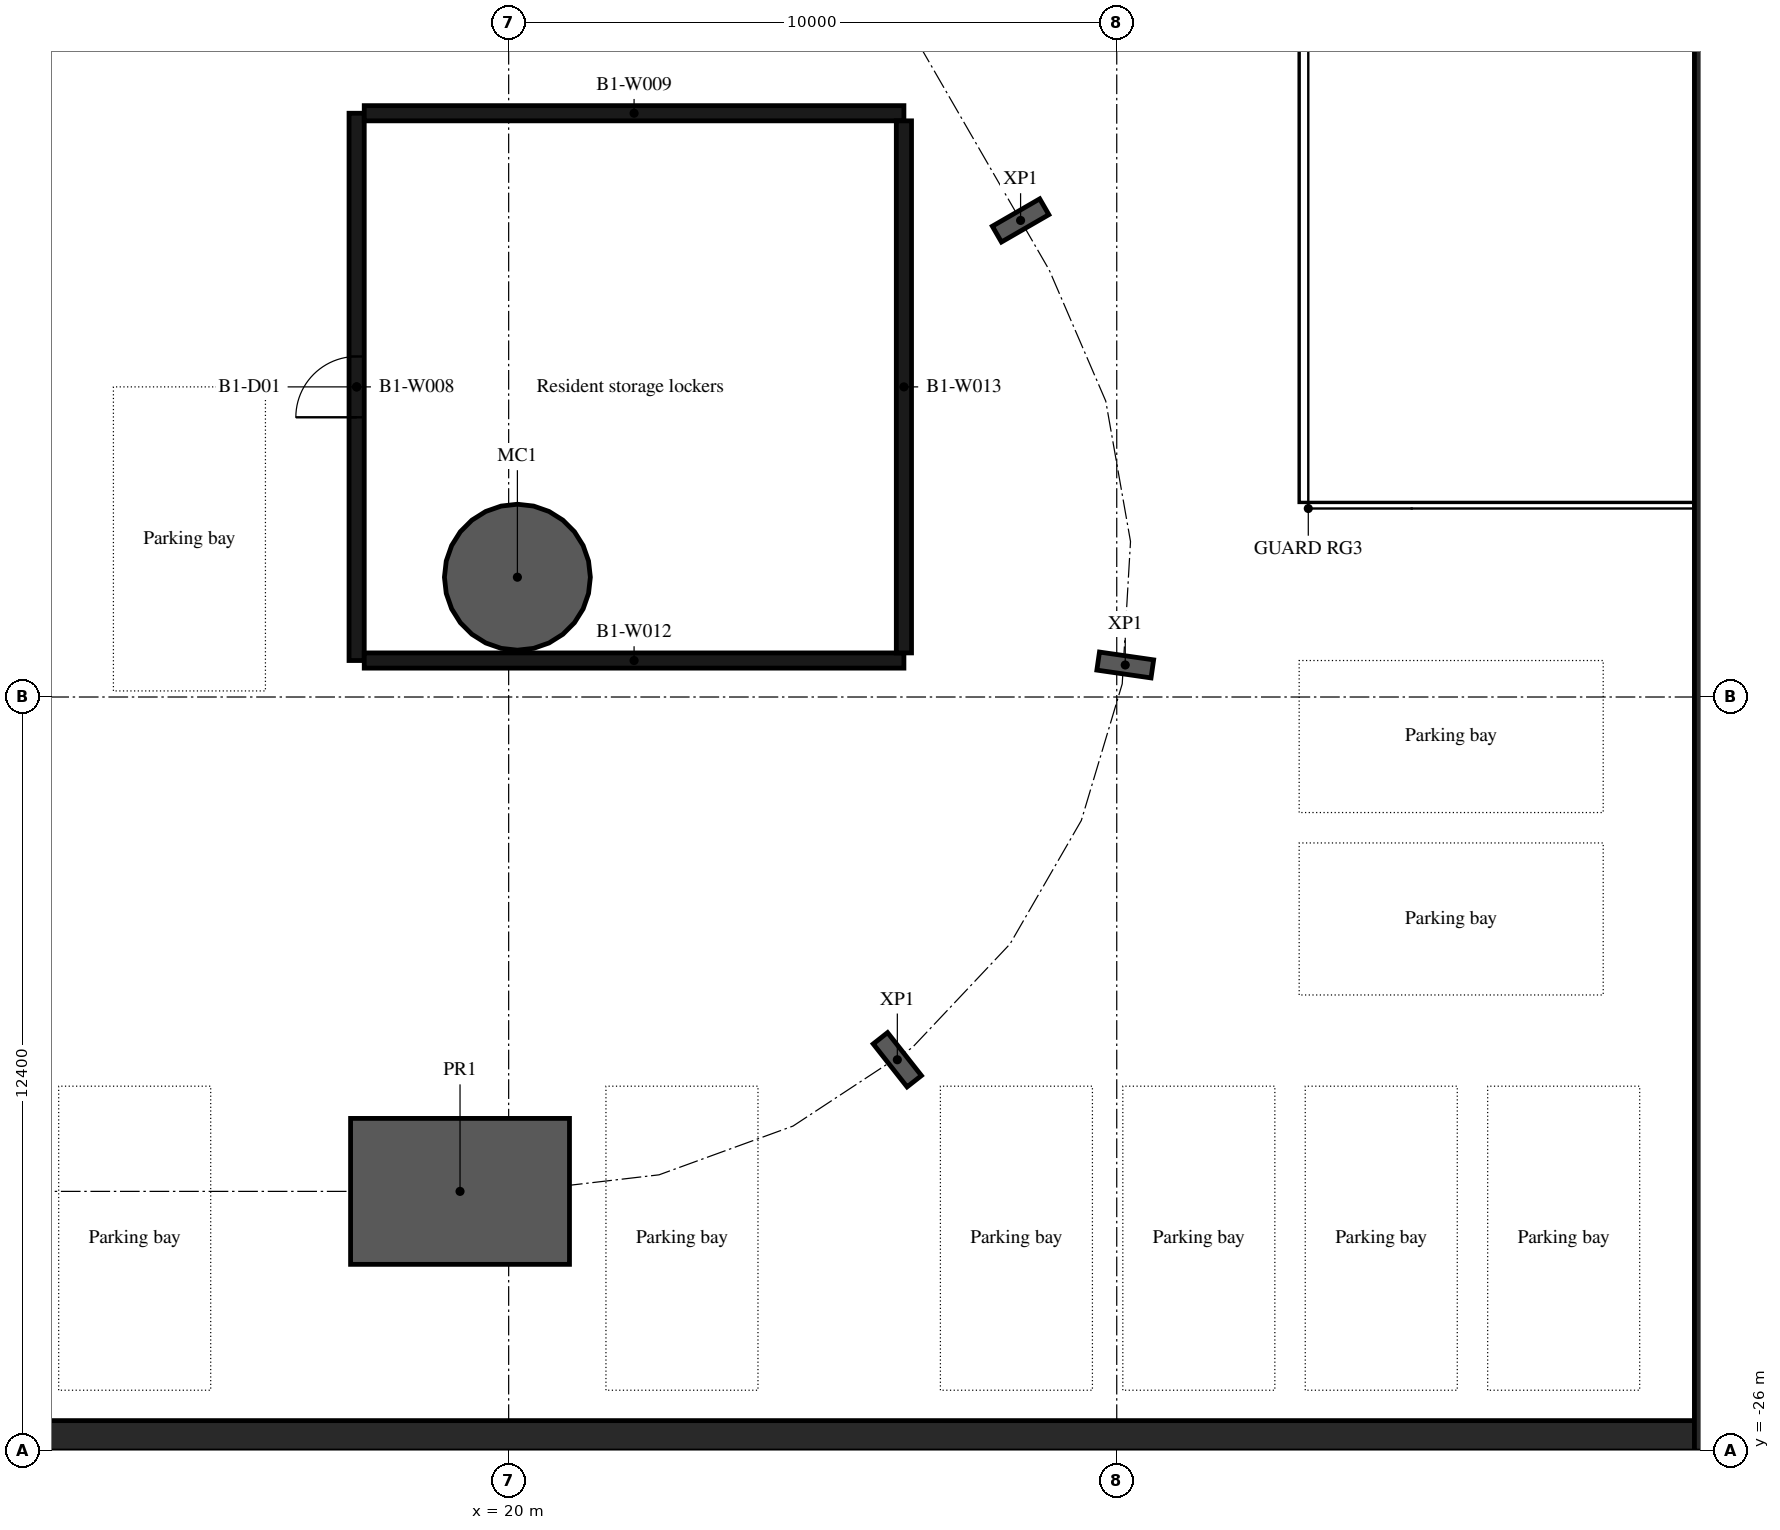
"""IFC4 building model, lengths in metres.
Left out: names, types, materials, properties, quantities, classifications, styles, units other than length and angle.
Written with IfcOpenShell. Run it as: python <this file> out.ifc"""

import sys

from ifc_helpers import new_model, si_unit, direction, frame, frame_2d, origin, origin_2d, place, context, subcontext, project, spatial, rectangle, hollow_circle, i_section, extrude, element, fill, save


model = new_model("IFC4")
c1 = context("Model", 3, precision=1e-05, world=origin(), true_north=direction((0.0, 1.0)))
c2 = subcontext(c1, "Body", "Model", "MODEL_VIEW")
j1 = project(units=[si_unit("LENGTHUNIT", "METRE"), si_unit("PLANEANGLEUNIT", "RADIAN")], contexts=[c1])
p1 = place(None, origin())
s1 = spatial("IfcSite", under=j1, at=p1, CompositionType="ELEMENT")
p2 = place(p1, origin())
s2 = spatial("IfcBuilding", under=s1, at=p2, CompositionType="ELEMENT")
p3 = place(p2, frame((0.0, 0.0, -4.2)))
s3 = spatial("IfcBuildingStorey", under=s2, at=p3, CompositionType="ELEMENT", Elevation=-4.2)
p4 = place(p3, frame((20.144, -11.63, -0.38), z_axis=(0.0, 0.0, 1.0), x_axis=(1.0, 0.0, 0.0)))
e1 = element("IfcColumn", 1, at=p4, inside=s3, PredefinedType="COLUMN", context=c2, shape_type="SweptSolid", body=[
    extrude(hollow_circle(Radius=1.2, WallThickness=0.06, at=origin_2d()), origin(), (0.0, 0.0, 1.0), 4.16),
])
for number, where, z_axis, x_axis in (
    (2, (26.392, -19.565, -0.38), (0.0, 0.0, 1.0), (-0.786, -0.619, 0.0)),
    (3, (30.14, -13.073, -0.38), (0.0, 0.0, 1.0), (-0.143, -0.99, 0.0)),
    (4, (28.419, -5.763, -0.38), (0.0, 0.0, 1.0), (0.5, -0.866, 0.0)),
):
    element("IfcColumn", number, at=place(p3, frame(where, z_axis=z_axis, x_axis=x_axis)), inside=s3, PredefinedType="COLUMN", context=c2, shape_type="SweptSolid", body=[
        extrude(i_section(OverallWidth=0.3, OverallDepth=0.9, WebThickness=0.019, FlangeThickness=0.035, FilletRadius=0.03, at=origin_2d()), origin(), (0.0, 0.0, 1.0), 4.16),
    ])
p5 = place(p3, frame((19.2, -21.73, -0.38), z_axis=(0.0, 0.0, 1.0), x_axis=(1.0, 0.0, 0.0)))
e5 = element("IfcColumn", 5, at=p5, inside=s3, PredefinedType="COLUMN", context=c2, shape_type="SweptSolid", body=[
    extrude(rectangle(XDim=3.6, YDim=2.4, at=origin_2d()), origin(), (0.0, 0.0, 1.0), 4.16),
])
p6 = place(p3, frame((-40.0, -25.75, -0.38), z_axis=(0.0, 0.0, 1.0), x_axis=(1.0, 0.0, 0.0)))
e6 = element("IfcWall", 6, at=p6, inside=s3, PredefinedType="SOLIDWALL", context=c2, shape_type="SweptSolid", body=[
    extrude(rectangle(XDim=80.0, YDim=0.5, at=frame_2d((40.0, 0.0))), origin(), (0.0, 0.0, 1.0), 3.88),
])
p7 = place(p3, frame((39.75, -26.0, -0.38), z_axis=(0.0, 0.0, 1.0), x_axis=(0.0, 1.0, 0.0)))
e7 = element("IfcWall", 7, at=p7, inside=s3, PredefinedType="SOLIDWALL", context=c2, shape_type="SweptSolid", body=[
    extrude(rectangle(XDim=62.0, YDim=0.5, at=frame_2d((31.0, 0.0))), origin(), (0.0, 0.0, 1.0), 3.88),
])
p8 = place(p3, frame((17.5, -13.0, 0.0), z_axis=(0.0, 0.0, 1.0), x_axis=(0.0, 1.0, 0.0)))
e8 = element("IfcWall", 8, at=p8, inside=s3, PredefinedType="PARTITIONING", context=c2, shape_type="SweptSolid", body=[
    extrude(rectangle(XDim=9.0, YDim=0.25, at=frame_2d((4.5, 0.0))), origin(), (0.0, 0.0, 1.0), 3.5),
])
p9 = place(p8, frame((4.0, 0.0, 0.0)))
e9 = element("IfcOpeningElement", 9, at=p9, cuts=e8, PredefinedType="OPENING", context=c2, shape_type="SweptSolid", body=[
    extrude(rectangle(XDim=1.0, YDim=2.1, at=frame_2d((0.5, 1.05))), frame((0.0, 0.135, 0.0), z_axis=(0.0, -1.0, 0.0), x_axis=(1.0, 0.0, 0.0)), (0.0, 0.0, 1.0), 0.27),
])
for number, where, z_axis, x_axis in (
    (10, (17.625, -4.0, 0.0), (0.0, 0.0, 1.0), (1.0, 0.0, 0.0)),
    (11, (26.5, -13.0, 0.0), (0.0, 0.0, 1.0), (-1.0, 0.0, 0.0)),
):
    element("IfcWall", number, at=place(p3, frame(where, z_axis=z_axis, x_axis=x_axis)), inside=s3, PredefinedType="PARTITIONING", context=c2, shape_type="SweptSolid", body=[
        extrude(rectangle(XDim=8.875, YDim=0.25, at=frame_2d((4.438, 0.0))), origin(), (0.0, 0.0, 1.0), 3.5),
    ])
p10 = place(p3, frame((26.5, -4.125, 0.0), z_axis=(0.0, 0.0, 1.0), x_axis=(0.0, -1.0, 0.0)))
e12 = element("IfcWall", 12, at=p10, inside=s3, PredefinedType="PARTITIONING", context=c2, shape_type="SweptSolid", body=[
    extrude(rectangle(XDim=8.75, YDim=0.25, at=frame_2d((4.375, 0.0))), origin(), (0.0, 0.0, 1.0), 3.11),
])
p11 = place(p9, origin())
e13 = element("IfcDoor", 13, at=p11, inside=s3, OperationType="SINGLE_SWING_LEFT", PredefinedType="DOOR", context=c2, shape_type="SweptSolid", body=[
    extrude(rectangle(XDim=1.0, YDim=2.1, at=frame_2d((0.5, 1.05))), frame((0.0, 0.025, 0.0), z_axis=(0.0, -1.0, 0.0), x_axis=(1.0, 0.0, 0.0)), (0.0, 0.0, 1.0), 0.05),
])
fill(e9, e13)
save(model, sys.argv[1])
